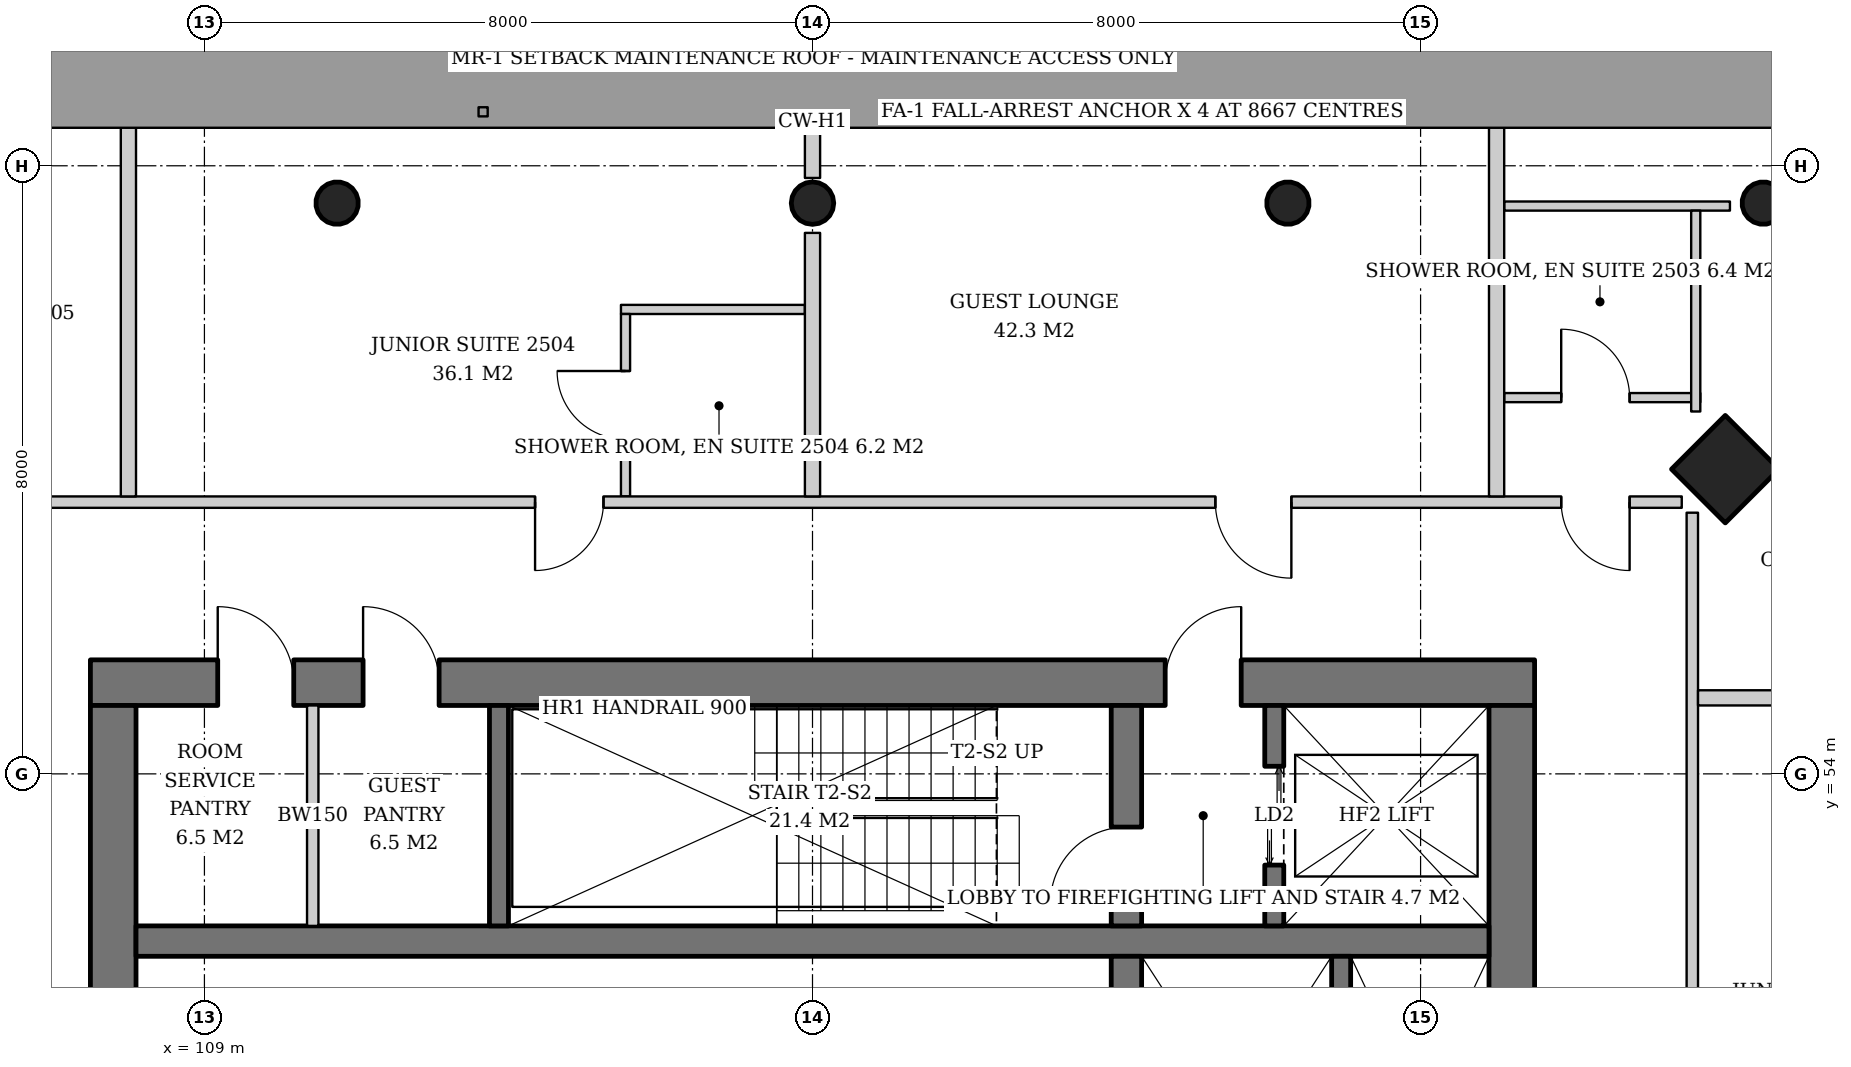
"""IFC4 building model, lengths in metres.
Left out: names, types, materials, properties, quantities, classifications, styles, units other than length and angle.
Written with IfcOpenShell. Run it as: python <this file> out.ifc"""

import sys

from ifc_helpers import new_model, si_unit, direction, frame, frame_2d, origin, origin_2d, place, context, subcontext, project, spatial, rectangle, hollow_circle, extrude, element, fill, save


model = new_model("IFC4")
c1 = context("Model", 3, precision=1e-05, world=origin(), true_north=direction((0.0, 1.0)))
c2 = subcontext(c1, "Body", "Model", "MODEL_VIEW")
j1 = project(units=[si_unit("LENGTHUNIT", "METRE"), si_unit("PLANEANGLEUNIT", "RADIAN")], contexts=[c1])
p1 = place(None, origin())
s1 = spatial("IfcSite", under=j1, at=p1, CompositionType="ELEMENT")
p2 = place(p1, origin())
s2 = spatial("IfcBuilding", under=s1, at=p2, CompositionType="ELEMENT")
p3 = place(p2, frame((0.0, 0.0, 100.8)))
s3 = spatial("IfcBuildingStorey", under=s2, at=p3, CompositionType="ELEMENT", Elevation=100.8)
p4 = place(p3, frame((129.06, 58.06, 0.0), z_axis=(-0.043029647111, -0.043029647111, 0.998146732169), x_axis=(0.707106781187, -0.707106781187, 0.0)))
e1 = element("IfcColumn", 1, at=p4, inside=s3, PredefinedType="COLUMN", context=c2, shape_type="SweptSolid", body=[
    extrude(rectangle(XDim=1.0, YDim=1.0, at=origin_2d()), origin(), (0.0, 0.0, 1.0), 3.807),
])
p5 = place(p3, frame((129.56, 61.56, 0.0), z_axis=(-0.043029647111, -0.043029647111, 0.998146732169), x_axis=(0.707106781187, -0.707106781187, 0.0)))
e2 = element("IfcColumn", 2, at=p5, inside=s3, PredefinedType="COLUMN", context=c2, shape_type="SweptSolid", body=[
    extrude(hollow_circle(Radius=0.28, WallThickness=0.02, at=origin_2d()), origin(), (0.0, 0.0, 1.0), 3.807),
])
p6 = place(p3, frame((123.28, 61.56, 0.0), z_axis=(-0.021561848751, -0.043059525333, 0.998839808957), x_axis=(0.894160516368, -0.44774654769, 0.0)))
e3 = element("IfcColumn", 3, at=p6, inside=s3, PredefinedType="COLUMN", context=c2, shape_type="SweptSolid", body=[
    extrude(hollow_circle(Radius=0.28, WallThickness=0.02, at=origin_2d()), origin(), (0.0, 0.0, 1.0), 3.804),
])
p7 = place(p3, frame((117.0, 61.56, 0.0), z_axis=(0.0, -0.043069538298, 0.999072076915), x_axis=(1.0, 0.0, 0.0)))
e4 = element("IfcColumn", 4, at=p7, inside=s3, PredefinedType="COLUMN", context=c2, shape_type="SweptSolid", body=[
    extrude(hollow_circle(Radius=0.28, WallThickness=0.02, at=origin_2d()), origin(), (0.0, 0.0, 1.0), 3.803),
])
p8 = place(p3, frame((110.72, 61.56, 0.0), z_axis=(0.021561848751, -0.043059525333, 0.998839808957), x_axis=(0.894160516368, 0.44774654769, 0.0)))
e5 = element("IfcColumn", 5, at=p8, inside=s3, PredefinedType="COLUMN", context=c2, shape_type="SweptSolid", body=[
    extrude(hollow_circle(Radius=0.28, WallThickness=0.02, at=origin_2d()), origin(), (0.0, 0.0, 1.0), 3.804),
])
p9 = place(p3, frame((107.5, 55.2, 0.0), z_axis=(0.0, 0.0, 1.0), x_axis=(1.0, 0.0, 0.0)))
e6 = element("IfcWall", 6, at=p9, inside=s3, PredefinedType="SHEAR", context=c2, shape_type="SweptSolid", body=[
    extrude(rectangle(XDim=19.0, YDim=0.6, at=frame_2d((9.5, 0.0))), origin(), (0.0, 0.0, 1.0), 3.8),
])
p10 = place(p9, frame((14.14, 0.0, 0.0)))
e7 = element("IfcOpeningElement", 7, at=p10, cuts=e6, PredefinedType="OPENING", context=c2, shape_type="SweptSolid", body=[
    extrude(rectangle(XDim=1.0, YDim=2.1, at=frame_2d((0.5, 1.05))), frame((0.0, 0.31, 0.0), z_axis=(0.0, -1.0, 0.0), x_axis=(1.0, 0.0, 0.0)), (0.0, 0.0, 1.0), 0.62),
])
p11 = place(p9, frame((1.675, 0.0, 0.0)))
e8 = element("IfcOpeningElement", 8, at=p11, cuts=e6, PredefinedType="OPENING", context=c2, shape_type="SweptSolid", body=[
    extrude(rectangle(XDim=1.0, YDim=2.1, at=frame_2d((0.5, 1.05))), frame((0.0, 0.31, 0.0), z_axis=(0.0, -1.0, 0.0), x_axis=(1.0, 0.0, 0.0)), (0.0, 0.0, 1.0), 0.62),
])
p12 = place(p9, frame((3.587, 0.0, 0.0)))
e9 = element("IfcOpeningElement", 9, at=p12, cuts=e6, PredefinedType="OPENING", context=c2, shape_type="SweptSolid", body=[
    extrude(rectangle(XDim=1.0, YDim=2.1, at=frame_2d((0.5, 1.05))), frame((0.0, 0.31, 0.0), z_axis=(0.0, -1.0, 0.0), x_axis=(1.0, 0.0, 0.0)), (0.0, 0.0, 1.0), 0.62),
])
p13 = place(p3, frame((107.8, 37.1, 0.0), z_axis=(0.0, 0.0, 1.0), x_axis=(0.0, 1.0, 0.0)))
e10 = element("IfcWall", 10, at=p13, inside=s3, PredefinedType="SHEAR", context=c2, shape_type="SweptSolid", body=[
    extrude(rectangle(XDim=17.8, YDim=0.6, at=frame_2d((8.9, 0.0))), origin(), (0.0, 0.0, 1.0), 3.8),
])
p14 = place(p13, frame((8.0, 0.0, 0.0)))
e11 = element("IfcOpeningElement", 11, at=p14, cuts=e10, PredefinedType="OPENING", context=c2, shape_type="SweptSolid", body=[
    extrude(rectangle(XDim=1.8, YDim=2.4, at=frame_2d((0.9, 1.2))), frame((0.0, 0.31, 0.0), z_axis=(0.0, -1.0, 0.0), x_axis=(1.0, 0.0, 0.0)), (0.0, 0.0, 1.0), 0.62),
])
p15 = place(p3, frame((126.2, 37.1, 0.0), z_axis=(0.0, 0.0, 1.0), x_axis=(0.0, 1.0, 0.0)))
e12 = element("IfcWall", 12, at=p15, inside=s3, PredefinedType="SHEAR", context=c2, shape_type="SweptSolid", body=[
    extrude(rectangle(XDim=17.8, YDim=0.6, at=frame_2d((8.9, 0.0))), origin(), (0.0, 0.0, 1.0), 3.8),
])
p16 = place(p15, frame((8.0, 0.0, 0.0)))
e13 = element("IfcOpeningElement", 13, at=p16, cuts=e12, PredefinedType="OPENING", context=c2, shape_type="SweptSolid", body=[
    extrude(rectangle(XDim=1.8, YDim=2.4, at=frame_2d((0.9, 1.2))), frame((0.0, 0.31, 0.0), z_axis=(0.0, -1.0, 0.0), x_axis=(1.0, 0.0, 0.0)), (0.0, 0.0, 1.0), 0.62),
])
p17 = place(p3, frame((108.1, 51.8, 0.0), z_axis=(0.0, 0.0, 1.0), x_axis=(1.0, 0.0, 0.0)))
e14 = element("IfcWall", 14, at=p17, inside=s3, PredefinedType="SHEAR", context=c2, shape_type="SweptSolid", body=[
    extrude(rectangle(XDim=17.8, YDim=0.4, at=frame_2d((8.9, 0.0))), origin(), (0.0, 0.0, 1.0), 3.8),
])
p18 = place(p3, frame((121.13, 40.4, 0.0), z_axis=(0.0, 0.0, 1.0), x_axis=(0.0, 1.0, 0.0)))
e15 = element("IfcWall", 15, at=p18, inside=s3, PredefinedType="SHEAR", context=c2, shape_type="SweptSolid", body=[
    extrude(rectangle(XDim=11.2, YDim=0.4, at=frame_2d((5.6, 0.0))), origin(), (0.0, 0.0, 1.0), 3.8),
])
p19 = place(p3, frame((121.13, 52.0, 0.0), z_axis=(0.0, 0.0, 1.0), x_axis=(0.0, 1.0, 0.0)))
e16 = element("IfcWall", 16, at=p19, inside=s3, PredefinedType="SHEAR", context=c2, shape_type="SweptSolid", body=[
    extrude(rectangle(XDim=2.9, YDim=0.4, at=frame_2d((1.45, 0.0))), origin(), (0.0, 0.0, 1.0), 3.8),
])
p20 = place(p19, frame((0.3, 0.0, 0.0)))
e17 = element("IfcOpeningElement", 17, at=p20, cuts=e16, PredefinedType="OPENING", context=c2, shape_type="SweptSolid", body=[
    extrude(rectangle(XDim=1.0, YDim=2.1, at=frame_2d((0.5, 1.05))), frame((0.0, 0.21, 0.0), z_axis=(0.0, -1.0, 0.0), x_axis=(1.0, 0.0, 0.0)), (0.0, 0.0, 1.0), 0.42),
])
p21 = place(p3, frame((112.875, 52.0, 0.0), z_axis=(0.0, 0.0, 1.0), x_axis=(0.0, 1.0, 0.0)))
e18 = element("IfcWall", 18, at=p21, inside=s3, PredefinedType="SHEAR", context=c2, shape_type="SweptSolid", body=[
    extrude(rectangle(XDim=2.9, YDim=0.25, at=frame_2d((1.45, 0.0))), origin(), (0.0, 0.0, 1.0), 3.8),
])
p22 = place(p3, frame((123.075, 52.0, 0.0), z_axis=(0.0, 0.0, 1.0), x_axis=(0.0, 1.0, 0.0)))
e19 = element("IfcWall", 19, at=p22, inside=s3, PredefinedType="SHEAR", context=c2, shape_type="SweptSolid", body=[
    extrude(rectangle(XDim=2.9, YDim=0.25, at=frame_2d((1.45, 0.0))), origin(), (0.0, 0.0, 1.0), 3.8),
])
p23 = place(p22, frame((0.8, 0.0, 0.0)))
e20 = element("IfcOpeningElement", 20, at=p23, cuts=e19, PredefinedType="OPENING", context=c2, shape_type="SweptSolid", body=[
    extrude(rectangle(XDim=1.3, YDim=2.2, at=frame_2d((0.65, 1.1))), frame((0.0, 0.135, 0.0), z_axis=(0.0, -1.0, 0.0), x_axis=(1.0, 0.0, 0.0)), (0.0, 0.0, 1.0), 0.27),
])
p24 = place(p3, frame((123.955, 47.75, 0.0), z_axis=(0.0, 0.0, 1.0), x_axis=(0.0, 1.0, 0.0)))
e21 = element("IfcWall", 21, at=p24, inside=s3, PredefinedType="SHEAR", context=c2, shape_type="SweptSolid", body=[
    extrude(rectangle(XDim=3.85, YDim=0.25, at=frame_2d((1.925, 0.0))), origin(), (0.0, 0.0, 1.0), 3.8),
])
p25 = place(p3, frame((110.425, 52.0, 0.0), z_axis=(0.0, 0.0, 1.0), x_axis=(0.0, 1.0, 0.0)))
e22 = element("IfcWall", 22, at=p25, inside=s3, PredefinedType="SOLIDWALL", context=c2, shape_type="SweptSolid", body=[
    extrude(rectangle(XDim=2.9, YDim=0.15, at=frame_2d((1.45, 0.0))), origin(), (0.0, 0.0, 1.0), 3.6),
])
p26 = place(p3, frame((128.575, 34.564, 0.0), z_axis=(0.0, 0.0, 1.0), x_axis=(0.0, 1.0, 0.0)))
e23 = element("IfcWall", 23, at=p26, inside=s3, PredefinedType="PARTITIONING", context=c2, shape_type="SweptSolid", body=[
    extrude(rectangle(XDim=22.872, YDim=0.15, at=frame_2d((11.436, 0.0))), origin(), (0.0, 0.0, 1.0), 2.9),
])
p27 = place(p26, frame((0.636, 0.0, 0.0)))
e24 = element("IfcOpeningElement", 24, at=p27, cuts=e23, PredefinedType="OPENING", context=c2, shape_type="SweptSolid", body=[
    extrude(rectangle(XDim=1.0, YDim=2.1, at=frame_2d((0.5, 1.05))), frame((0.0, 0.085, 0.0), z_axis=(0.0, -1.0, 0.0), x_axis=(1.0, 0.0, 0.0)), (0.0, 0.0, 1.0), 0.17),
])
p28 = place(p26, frame((5.186, 0.0, 0.0)))
e25 = element("IfcOpeningElement", 25, at=p28, cuts=e23, PredefinedType="OPENING", context=c2, shape_type="SweptSolid", body=[
    extrude(rectangle(XDim=0.9, YDim=2.1, at=frame_2d((0.45, 1.05))), frame((0.0, 0.085, 0.0), z_axis=(0.0, -1.0, 0.0), x_axis=(1.0, 0.0, 0.0)), (0.0, 0.0, 1.0), 0.17),
])
p29 = place(p26, frame((14.186, 0.0, 0.0)))
e26 = element("IfcOpeningElement", 26, at=p29, cuts=e23, PredefinedType="OPENING", context=c2, shape_type="SweptSolid", body=[
    extrude(rectangle(XDim=0.9, YDim=2.1, at=frame_2d((0.45, 1.05))), frame((0.0, 0.085, 0.0), z_axis=(0.0, -1.0, 0.0), x_axis=(1.0, 0.0, 0.0)), (0.0, 0.0, 1.0), 0.17),
])
p30 = place(p3, frame((128.65, 55.0, 0.0), z_axis=(0.0, 0.0, 1.0), x_axis=(1.0, 0.0, 0.0)))
e27 = element("IfcWall", 27, at=p30, inside=s3, PredefinedType="PARTITIONING", context=c2, shape_type="SweptSolid", body=[
    extrude(rectangle(XDim=4.89, YDim=0.2, at=frame_2d((2.445, 0.0))), origin(), (0.0, 0.0, 1.0), 3.2),
])
p31 = place(p3, frame((126.1, 58.95, 0.0), z_axis=(0.0, 0.0, 1.0), x_axis=(1.0, 0.0, 0.0)))
e28 = element("IfcWall", 28, at=p31, inside=s3, PredefinedType="PARTITIONING", context=c2, shape_type="SweptSolid", body=[
    extrude(rectangle(XDim=2.58, YDim=0.12, at=frame_2d((1.29, 0.0))), origin(), (0.0, 0.0, 1.0), 2.9),
])
p32 = place(p31, frame((0.75, 0.0, 0.0)))
e29 = element("IfcOpeningElement", 29, at=p32, cuts=e28, PredefinedType="OPENING", context=c2, shape_type="SweptSolid", body=[
    extrude(rectangle(XDim=0.9, YDim=2.1, at=frame_2d((0.45, 1.05))), frame((0.0, 0.07, 0.0), z_axis=(0.0, -1.0, 0.0), x_axis=(1.0, 0.0, 0.0)), (0.0, 0.0, 1.0), 0.14),
])
p33 = place(p3, frame((126.1, 61.47, 0.0), z_axis=(0.0, 0.0, 1.0), x_axis=(1.0, 0.0, 0.0)))
e30 = element("IfcWall", 30, at=p33, inside=s3, PredefinedType="PARTITIONING", context=c2, shape_type="SweptSolid", body=[
    extrude(rectangle(XDim=2.97, YDim=0.12, at=frame_2d((1.485, 0.0))), origin(), (0.0, 0.0, 1.0), 3.2),
])
p34 = place(p3, frame((128.62, 58.767, 0.0), z_axis=(0.0, 0.0, 1.0), x_axis=(0.0, 1.0, 0.0)))
e31 = element("IfcWall", 31, at=p34, inside=s3, PredefinedType="PARTITIONING", context=c2, shape_type="SweptSolid", body=[
    extrude(rectangle(XDim=2.643, YDim=0.12, at=frame_2d((1.321, 0.0))), origin(), (0.0, 0.0, 1.0), 3.2),
])
p35 = place(p3, frame((116.9, 60.11, 0.0), z_axis=(0.0, 0.0, 1.0), x_axis=(-1.0, 0.0, 0.0)))
e32 = element("IfcWall", 32, at=p35, inside=s3, PredefinedType="PARTITIONING", context=c2, shape_type="SweptSolid", body=[
    extrude(rectangle(XDim=2.42, YDim=0.12, at=frame_2d((1.21, 0.0))), origin(), (0.0, 0.0, 1.0), 3.6),
])
p36 = place(p3, frame((114.54, 57.65, 0.0), z_axis=(0.0, 0.0, 1.0), x_axis=(0.0, 1.0, 0.0)))
e33 = element("IfcWall", 33, at=p36, inside=s3, PredefinedType="PARTITIONING", context=c2, shape_type="SweptSolid", body=[
    extrude(rectangle(XDim=2.4, YDim=0.12, at=frame_2d((1.2, 0.0))), origin(), (0.0, 0.0, 1.0), 3.6),
])
p37 = place(p36, frame((0.75, 0.0, 0.0)))
e34 = element("IfcOpeningElement", 34, at=p37, cuts=e33, PredefinedType="OPENING", context=c2, shape_type="SweptSolid", body=[
    extrude(rectangle(XDim=0.9, YDim=2.1, at=frame_2d((0.45, 1.05))), frame((0.0, 0.07, 0.0), z_axis=(0.0, -1.0, 0.0), x_axis=(1.0, 0.0, 0.0)), (0.0, 0.0, 1.0), 0.14),
])
p38 = place(p3, frame((128.436, 57.575, 0.0), z_axis=(0.0, 0.0, 1.0), x_axis=(-1.0, 0.0, 0.0)))
e35 = element("IfcWall", 35, at=p38, inside=s3, PredefinedType="PARTITIONING", context=c2, shape_type="SweptSolid", body=[
    extrude(rectangle(XDim=22.872, YDim=0.15, at=frame_2d((11.436, 0.0))), origin(), (0.0, 0.0, 1.0), 2.9),
])
p39 = place(p38, frame((0.686, 0.0, 0.0)))
e36 = element("IfcOpeningElement", 36, at=p39, cuts=e35, PredefinedType="OPENING", context=c2, shape_type="SweptSolid", body=[
    extrude(rectangle(XDim=0.9, YDim=2.1, at=frame_2d((0.45, 1.05))), frame((0.0, 0.085, 0.0), z_axis=(0.0, -1.0, 0.0), x_axis=(1.0, 0.0, 0.0)), (0.0, 0.0, 1.0), 0.17),
])
p40 = place(p38, frame((5.136, 0.0, 0.0)))
e37 = element("IfcOpeningElement", 37, at=p40, cuts=e35, PredefinedType="OPENING", context=c2, shape_type="SweptSolid", body=[
    extrude(rectangle(XDim=1.0, YDim=2.1, at=frame_2d((0.5, 1.05))), frame((0.0, 0.085, 0.0), z_axis=(0.0, -1.0, 0.0), x_axis=(1.0, 0.0, 0.0)), (0.0, 0.0, 1.0), 0.17),
])
p41 = place(p38, frame((14.186, 0.0, 0.0)))
e38 = element("IfcOpeningElement", 38, at=p41, cuts=e35, PredefinedType="OPENING", context=c2, shape_type="SweptSolid", body=[
    extrude(rectangle(XDim=0.9, YDim=2.1, at=frame_2d((0.45, 1.05))), frame((0.0, 0.085, 0.0), z_axis=(0.0, -1.0, 0.0), x_axis=(1.0, 0.0, 0.0)), (0.0, 0.0, 1.0), 0.17),
])
p42 = place(p3, frame((126.0, 57.65, 0.0), z_axis=(0.0, 0.0, 1.0), x_axis=(0.0, 1.0, 0.0)))
e39 = element("IfcWall", 39, at=p42, inside=s3, PredefinedType="PARTITIONING", context=c2, shape_type="SweptSolid", body=[
    extrude(rectangle(XDim=4.89, YDim=0.2, at=frame_2d((2.445, 0.0))), origin(), (0.0, 0.0, 1.0), 2.9),
])
p43 = place(p3, frame((117.0, 57.65, 0.0), z_axis=(0.0, 0.0, 1.0), x_axis=(0.0, 1.0, 0.0)))
e40 = element("IfcWall", 40, at=p43, inside=s3, PredefinedType="PARTITIONING", context=c2, shape_type="SweptSolid", body=[
    extrude(rectangle(XDim=3.467, YDim=0.2, at=frame_2d((1.733, 0.0))), origin(), (0.0, 0.0, 1.0), 3.6),
])
p44 = place(p3, frame((117.0, 61.84, 0.0), z_axis=(0.0, 0.0, 1.0), x_axis=(0.0, 1.0, 0.0)))
e41 = element("IfcWall", 41, at=p44, inside=s3, PredefinedType="PARTITIONING", context=c2, shape_type="SweptSolid", body=[
    extrude(rectangle(XDim=0.7, YDim=0.2, at=frame_2d((0.35, 0.0))), origin(), (0.0, 0.0, 1.0), 3.6),
])
p45 = place(p3, frame((108.0, 57.65, 0.0), z_axis=(0.0, 0.0, 1.0), x_axis=(0.0, 1.0, 0.0)))
e42 = element("IfcWall", 42, at=p45, inside=s3, PredefinedType="PARTITIONING", context=c2, shape_type="SweptSolid", body=[
    extrude(rectangle(XDim=4.89, YDim=0.2, at=frame_2d((2.445, 0.0))), origin(), (0.0, 0.0, 1.0), 3.2),
])
p46 = place(p23, origin())
e43 = element("IfcDoor", 43, at=p46, inside=s3, OperationType="DOUBLE_DOOR_SLIDING", PredefinedType="DOOR", context=c2, shape_type="SweptSolid", body=[
    extrude(rectangle(XDim=1.3, YDim=2.2, at=frame_2d((0.65, 1.1))), frame((0.0, 0.025, 0.0), z_axis=(0.0, -1.0, 0.0), x_axis=(1.0, 0.0, 0.0)), (0.0, 0.0, 1.0), 0.05),
])
fill(e20, e43)
p47 = place(p20, origin())
e44 = element("IfcDoor", 44, at=p47, inside=s3, OperationType="SINGLE_SWING_LEFT", PredefinedType="DOOR", context=c2, shape_type="SweptSolid", body=[
    extrude(rectangle(XDim=1.0, YDim=2.1, at=frame_2d((0.5, 1.05))), frame((0.0, 0.025, 0.0), z_axis=(0.0, -1.0, 0.0), x_axis=(1.0, 0.0, 0.0)), (0.0, 0.0, 1.0), 0.05),
])
fill(e17, e44)
p48 = place(p10, origin())
e45 = element("IfcDoor", 45, at=p48, inside=s3, OperationType="SINGLE_SWING_RIGHT", PredefinedType="DOOR", context=c2, shape_type="SweptSolid", body=[
    extrude(rectangle(XDim=1.0, YDim=2.1, at=frame_2d((0.5, 1.05))), frame((0.0, 0.025, 0.0), z_axis=(0.0, -1.0, 0.0), x_axis=(1.0, 0.0, 0.0)), (0.0, 0.0, 1.0), 0.05),
])
fill(e7, e45)
p49 = place(p11, origin())
e46 = element("IfcDoor", 46, at=p49, inside=s3, OperationType="SINGLE_SWING_LEFT", PredefinedType="DOOR", context=c2, shape_type="SweptSolid", body=[
    extrude(rectangle(XDim=1.0, YDim=2.1, at=frame_2d((0.5, 1.05))), frame((0.0, -0.24, 0.0), z_axis=(0.0, -1.0, 0.0), x_axis=(1.0, 0.0, 0.0)), (0.0, 0.0, 1.0), 0.05),
])
fill(e8, e46)
p50 = place(p12, origin())
e47 = element("IfcDoor", 47, at=p50, inside=s3, OperationType="SINGLE_SWING_LEFT", PredefinedType="DOOR", context=c2, shape_type="SweptSolid", body=[
    extrude(rectangle(XDim=1.0, YDim=2.1, at=frame_2d((0.5, 1.05))), frame((0.0, -0.24, 0.0), z_axis=(0.0, -1.0, 0.0), x_axis=(1.0, 0.0, 0.0)), (0.0, 0.0, 1.0), 0.05),
])
fill(e9, e47)
p51 = place(p32, origin())
e48 = element("IfcDoor", 48, at=p51, inside=s3, OperationType="SINGLE_SWING_LEFT", PredefinedType="DOOR", context=c2, shape_type="SweptSolid", body=[
    extrude(rectangle(XDim=0.9, YDim=2.1, at=frame_2d((0.45, 1.05))), frame((0.0, 0.025, 0.0), z_axis=(0.0, -1.0, 0.0), x_axis=(1.0, 0.0, 0.0)), (0.0, 0.0, 1.0), 0.05),
])
fill(e29, e48)
p52 = place(p37, origin())
e49 = element("IfcDoor", 49, at=p52, inside=s3, OperationType="SINGLE_SWING_RIGHT", PredefinedType="DOOR", context=c2, shape_type="SweptSolid", body=[
    extrude(rectangle(XDim=0.9, YDim=2.1, at=frame_2d((0.45, 1.05))), frame((0.0, 0.025, 0.0), z_axis=(0.0, -1.0, 0.0), x_axis=(1.0, 0.0, 0.0)), (0.0, 0.0, 1.0), 0.05),
])
fill(e34, e49)
p53 = place(p39, origin())
e50 = element("IfcDoor", 50, at=p53, inside=s3, OperationType="SINGLE_SWING_LEFT", PredefinedType="DOOR", context=c2, shape_type="SweptSolid", body=[
    extrude(rectangle(XDim=0.9, YDim=2.1, at=frame_2d((0.45, 1.05))), frame((0.0, 0.025, 0.0), z_axis=(0.0, -1.0, 0.0), x_axis=(1.0, 0.0, 0.0)), (0.0, 0.0, 1.0), 0.05),
])
fill(e36, e50)
p54 = place(p40, origin())
e51 = element("IfcDoor", 51, at=p54, inside=s3, OperationType="SINGLE_SWING_LEFT", PredefinedType="DOOR", context=c2, shape_type="SweptSolid", body=[
    extrude(rectangle(XDim=1.0, YDim=2.1, at=frame_2d((0.5, 1.05))), frame((0.0, 0.025, 0.0), z_axis=(0.0, -1.0, 0.0), x_axis=(1.0, 0.0, 0.0)), (0.0, 0.0, 1.0), 0.05),
])
fill(e37, e51)
p55 = place(p41, origin())
e52 = element("IfcDoor", 52, at=p55, inside=s3, OperationType="SINGLE_SWING_RIGHT", PredefinedType="DOOR", context=c2, shape_type="SweptSolid", body=[
    extrude(rectangle(XDim=0.9, YDim=2.1, at=frame_2d((0.45, 1.05))), frame((0.0, 0.025, 0.0), z_axis=(0.0, -1.0, 0.0), x_axis=(1.0, 0.0, 0.0)), (0.0, 0.0, 1.0), 0.05),
])
fill(e38, e52)
save(model, sys.argv[1])
